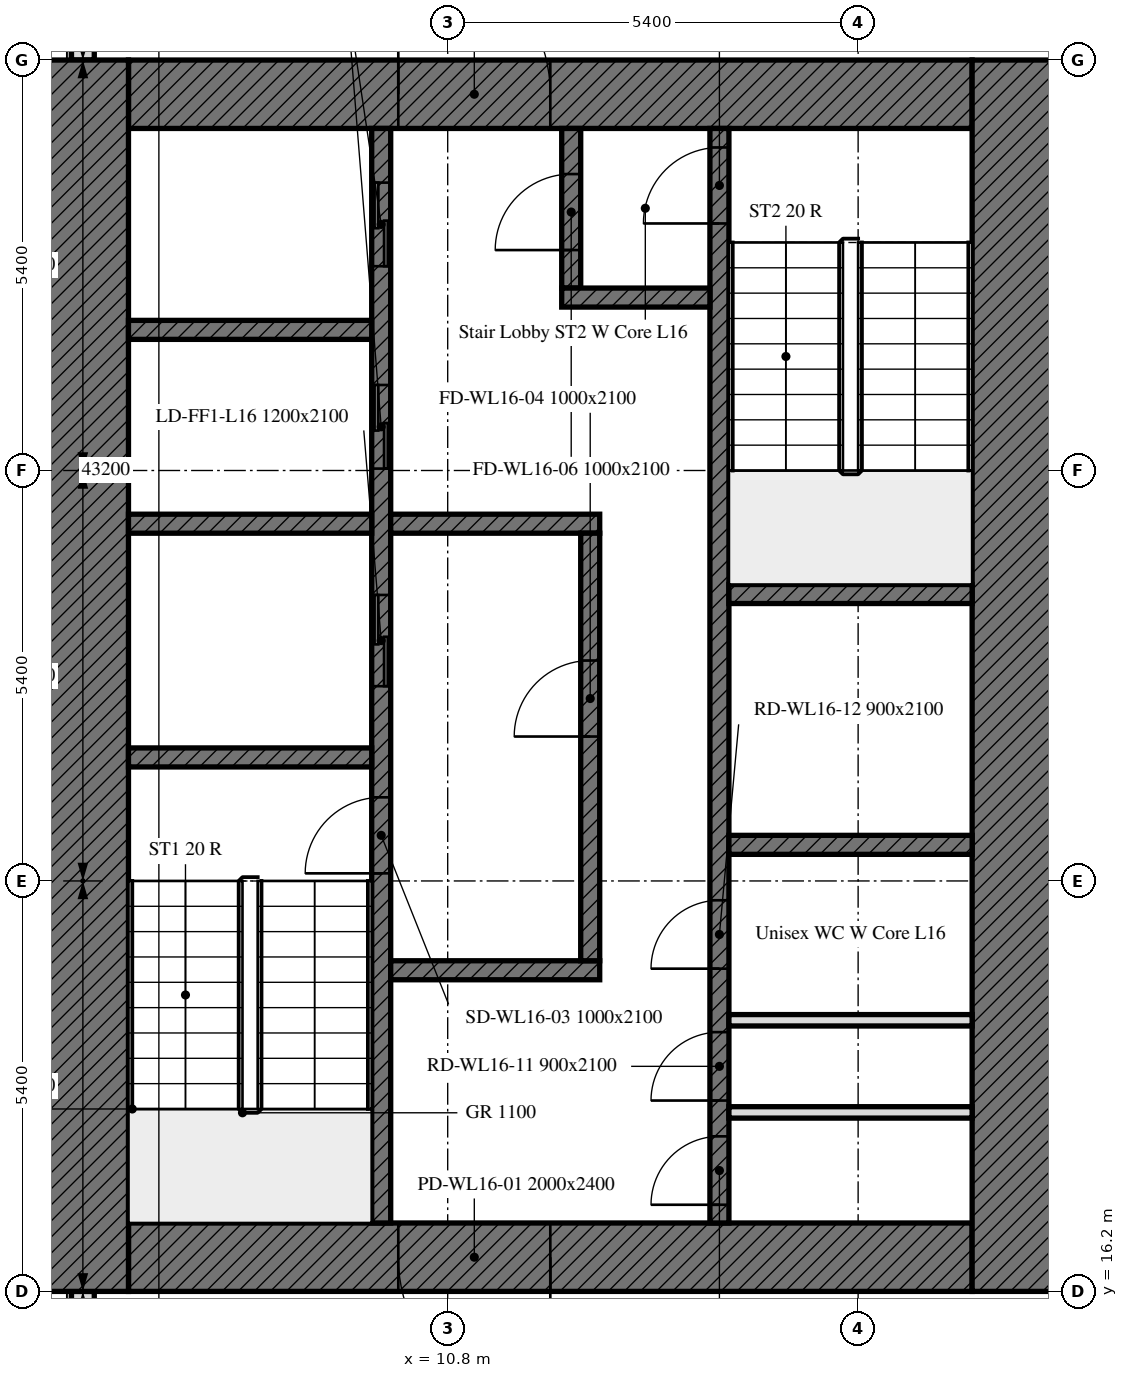
"""IFC4 building model, lengths in metres.
Left out: names, types, materials, properties, quantities, classifications, styles, units other than length and angle.
Written with IfcOpenShell. Run it as: python <this file> out.ifc"""

import sys

from ifc_helpers import new_model, si_unit, direction, frame, frame_2d, origin, place, context, subcontext, project, spatial, rectangle, extrude, element, fill, save


model = new_model("IFC4")
c1 = context("Model", 3, precision=1e-05, world=origin(), true_north=direction((0.0, 1.0)))
c2 = subcontext(c1, "Body", "Model", "MODEL_VIEW")
j1 = project(units=[si_unit("LENGTHUNIT", "METRE"), si_unit("PLANEANGLEUNIT", "RADIAN")], contexts=[c1])
p1 = place(None, origin())
s1 = spatial("IfcSite", under=j1, at=p1, CompositionType="ELEMENT")
p2 = place(p1, origin())
s2 = spatial("IfcBuilding", under=s1, at=p2, CompositionType="ELEMENT")
p3 = place(p2, frame((0.0, 0.0, 72.6)))
s3 = spatial("IfcBuildingStorey", under=s2, at=p3, CompositionType="ELEMENT", Elevation=72.6)
p4 = place(p3, frame((6.0, 43.014, 0.0), z_axis=(0.0, 0.0, 1.0), x_axis=(0.0, -1.0, 0.0)))
e1 = element("IfcWall", 1, at=p4, inside=s3, PredefinedType="SOLIDWALL", context=c2, shape_type="SweptSolid", body=[
    extrude(rectangle(XDim=10.614, YDim=0.3, at=frame_2d((5.307, 0.0))), origin(), (0.0, 0.0, 1.0), 3.5),
])
p5 = place(p4, frame((0.814, 0.0, 0.9)))
e2 = element("IfcOpeningElement", 2, at=p5, cuts=e1, PredefinedType="OPENING", context=c2, shape_type="SweptSolid", body=[
    extrude(rectangle(XDim=3.4, YDim=1.7, at=frame_2d((1.7, 0.85))), frame((0.0, 0.16, 0.0), z_axis=(0.0, -1.0, 0.0), x_axis=(1.0, 0.0, 0.0)), (0.0, 0.0, 1.0), 0.32),
])
p6 = place(p3, frame((6.0, 16.2, 0.0), z_axis=(0.0, 0.0, 1.0), x_axis=(0.0, -1.0, 0.0)))
e3 = element("IfcWall", 3, at=p6, inside=s3, PredefinedType="SOLIDWALL", context=c2, shape_type="SweptSolid", body=[
    extrude(rectangle(XDim=5.214, YDim=0.3, at=frame_2d((2.607, 0.0))), origin(), (0.0, 0.0, 1.0), 3.5),
])
p7 = place(p3, frame((17.7, 16.65, 0.0), z_axis=(0.0, 0.0, 1.0), x_axis=(-1.0, 0.0, 0.0)))
e4 = element("IfcWall", 4, at=p7, inside=s3, PredefinedType="SOLIDWALL", context=c2, shape_type="SweptSolid", body=[
    extrude(rectangle(XDim=11.1, YDim=0.9, at=frame_2d((5.55, 0.0))), origin(), (0.0, 0.0, 1.0), 3.5),
])
p8 = place(p7, frame((5.55, 0.0, 0.0)))
e5 = element("IfcOpeningElement", 5, at=p8, cuts=e4, PredefinedType="OPENING", context=c2, shape_type="SweptSolid", body=[
    extrude(rectangle(XDim=2.0, YDim=2.4, at=frame_2d((1.0, 1.2))), frame((0.0, 0.45, 0.0), z_axis=(0.0, -1.0, 0.0), x_axis=(1.0, 0.0, 0.0)), (0.0, 0.0, 1.0), 0.9),
])
p9 = place(p3, frame((6.6, 31.95, 0.0), z_axis=(0.0, 0.0, 1.0), x_axis=(1.0, 0.0, 0.0)))
e6 = element("IfcWall", 6, at=p9, inside=s3, PredefinedType="SOLIDWALL", context=c2, shape_type="SweptSolid", body=[
    extrude(rectangle(XDim=11.1, YDim=0.9, at=frame_2d((5.55, 0.0))), origin(), (0.0, 0.0, 1.0), 3.5),
])
p10 = place(p9, frame((3.55, 0.0, 0.0)))
e7 = element("IfcOpeningElement", 7, at=p10, cuts=e6, PredefinedType="OPENING", context=c2, shape_type="SweptSolid", body=[
    extrude(rectangle(XDim=2.0, YDim=2.4, at=frame_2d((1.0, 1.2))), frame((0.0, 0.45, 0.0), z_axis=(0.0, -1.0, 0.0), x_axis=(1.0, 0.0, 0.0)), (0.0, 0.0, 1.0), 0.9),
])
for number, where, z_axis, x_axis in (
    (8, (6.0, 16.2, 0.0), (0.0, 0.0, 1.0), (0.0, 1.0, 0.0)),
    (9, (18.3, 32.4, 0.0), (0.0, 0.0, 1.0), (0.0, -1.0, 0.0)),
):
    element("IfcWall", number, at=place(p3, frame(where, z_axis=z_axis, x_axis=x_axis)), inside=s3, PredefinedType="SOLIDWALL", context=c2, shape_type="SweptSolid", body=[
        extrude(rectangle(XDim=16.2, YDim=1.2, at=frame_2d((8.1, 0.0))), origin(), (0.0, 0.0, 1.0), 3.5),
    ])
p11 = place(p3, frame((9.925, 17.1, 0.0), z_axis=(0.0, 0.0, 1.0), x_axis=(0.0, 1.0, 0.0)))
e10 = element("IfcWall", 10, at=p11, inside=s3, PredefinedType="SOLIDWALL", context=c2, shape_type="SweptSolid", body=[
    extrude(rectangle(XDim=14.4, YDim=0.25, at=frame_2d((7.2, 0.0))), origin(), (0.0, 0.0, 1.0), 3.5),
])
p12 = place(p11, frame((4.6, 0.0, 0.0)))
e11 = element("IfcOpeningElement", 11, at=p12, cuts=e10, PredefinedType="OPENING", context=c2, shape_type="SweptSolid", body=[
    extrude(rectangle(XDim=1.0, YDim=2.1, at=frame_2d((0.5, 1.05))), frame((0.0, 0.125, 0.0), z_axis=(0.0, -1.0, 0.0), x_axis=(1.0, 0.0, 0.0)), (0.0, 0.0, 1.0), 0.25),
])
p13 = place(p11, frame((7.062, 0.0, 0.0)))
e12 = element("IfcOpeningElement", 12, at=p13, cuts=e10, PredefinedType="OPENING", context=c2, shape_type="SweptSolid", body=[
    extrude(rectangle(XDim=1.2, YDim=2.1, at=frame_2d((0.6, 1.05))), frame((0.0, 0.125, 0.0), z_axis=(0.0, -1.0, 0.0), x_axis=(1.0, 0.0, 0.0)), (0.0, 0.0, 1.0), 0.25),
])
p14 = place(p11, frame((9.925, 0.0, 0.0)))
e13 = element("IfcOpeningElement", 13, at=p14, cuts=e10, PredefinedType="OPENING", context=c2, shape_type="SweptSolid", body=[
    extrude(rectangle(XDim=1.1, YDim=2.1, at=frame_2d((0.55, 1.05))), frame((0.0, 0.125, 0.0), z_axis=(0.0, -1.0, 0.0), x_axis=(1.0, 0.0, 0.0)), (0.0, 0.0, 1.0), 0.25),
])
p15 = place(p11, frame((12.587, 0.0, 0.0)))
e14 = element("IfcOpeningElement", 14, at=p15, cuts=e10, PredefinedType="OPENING", context=c2, shape_type="SweptSolid", body=[
    extrude(rectangle(XDim=1.1, YDim=2.1, at=frame_2d((0.55, 1.05))), frame((0.0, 0.125, 0.0), z_axis=(0.0, -1.0, 0.0), x_axis=(1.0, 0.0, 0.0)), (0.0, 0.0, 1.0), 0.25),
])
p16 = place(p3, frame((14.375, 17.1, 0.0), z_axis=(0.0, 0.0, 1.0), x_axis=(0.0, 1.0, 0.0)))
e15 = element("IfcWall", 15, at=p16, inside=s3, PredefinedType="SOLIDWALL", context=c2, shape_type="SweptSolid", body=[
    extrude(rectangle(XDim=14.4, YDim=0.25, at=frame_2d((7.2, 0.0))), origin(), (0.0, 0.0, 1.0), 3.5),
])
p17 = place(p16, frame((13.15, 0.0, 0.0)))
e16 = element("IfcOpeningElement", 16, at=p17, cuts=e15, PredefinedType="OPENING", context=c2, shape_type="SweptSolid", body=[
    extrude(rectangle(XDim=1.0, YDim=2.1, at=frame_2d((0.5, 1.05))), frame((0.0, 0.125, 0.0), z_axis=(0.0, -1.0, 0.0), x_axis=(1.0, 0.0, 0.0)), (0.0, 0.0, 1.0), 0.25),
])
p18 = place(p16, frame((0.24, 0.0, 0.0)))
e17 = element("IfcOpeningElement", 17, at=p18, cuts=e15, PredefinedType="OPENING", context=c2, shape_type="SweptSolid", body=[
    extrude(rectangle(XDim=0.9, YDim=2.1, at=frame_2d((0.45, 1.05))), frame((0.0, 0.125, 0.0), z_axis=(0.0, -1.0, 0.0), x_axis=(1.0, 0.0, 0.0)), (0.0, 0.0, 1.0), 0.25),
])
p19 = place(p16, frame((1.611, 0.0, 0.0)))
e18 = element("IfcOpeningElement", 18, at=p19, cuts=e15, PredefinedType="OPENING", context=c2, shape_type="SweptSolid", body=[
    extrude(rectangle(XDim=0.9, YDim=2.1, at=frame_2d((0.45, 1.05))), frame((0.0, 0.125, 0.0), z_axis=(0.0, -1.0, 0.0), x_axis=(1.0, 0.0, 0.0)), (0.0, 0.0, 1.0), 0.25),
])
p20 = place(p16, frame((3.346, 0.0, 0.0)))
e19 = element("IfcOpeningElement", 19, at=p20, cuts=e15, PredefinedType="OPENING", context=c2, shape_type="SweptSolid", body=[
    extrude(rectangle(XDim=0.9, YDim=2.1, at=frame_2d((0.45, 1.05))), frame((0.0, 0.125, 0.0), z_axis=(0.0, -1.0, 0.0), x_axis=(1.0, 0.0, 0.0)), (0.0, 0.0, 1.0), 0.25),
])
for number, where, z_axis, x_axis in (
    (20, (6.6, 23.225, 0.0), (0.0, 0.0, 1.0), (1.0, 0.0, 0.0)),
    (21, (14.5, 25.375, 0.0), (0.0, 0.0, 1.0), (1.0, 0.0, 0.0)),
    (22, (14.5, 22.075, 0.0), (0.0, 0.0, 1.0), (1.0, 0.0, 0.0)),
    (23, (6.6, 26.3, 0.0), (0.0, 0.0, 1.0), (1.0, 0.0, 0.0)),
):
    element("IfcWall", number, at=place(p3, frame(where, z_axis=z_axis, x_axis=x_axis)), inside=s3, PredefinedType="SOLIDWALL", context=c2, shape_type="SweptSolid", body=[
        extrude(rectangle(XDim=3.2, YDim=0.25, at=frame_2d((1.6, 0.0))), origin(), (0.0, 0.0, 1.0), 3.5),
    ])
for number, where, z_axis, x_axis in (
    (24, (10.05, 26.3, 0.0), (0.0, 0.0, 1.0), (1.0, 0.0, 0.0)),
    (25, (10.05, 20.425, 0.0), (0.0, 0.0, 1.0), (1.0, 0.0, 0.0)),
):
    element("IfcWall", number, at=place(p3, frame(where, z_axis=z_axis, x_axis=x_axis)), inside=s3, PredefinedType="SOLIDWALL", context=c2, shape_type="SweptSolid", body=[
        extrude(rectangle(XDim=2.75, YDim=0.25, at=frame_2d((1.375, 0.0))), origin(), (0.0, 0.0, 1.0), 3.5),
    ])
p21 = place(p3, frame((12.425, 29.4, 0.0), z_axis=(0.0, 0.0, 1.0), x_axis=(0.0, 1.0, 0.0)))
e26 = element("IfcWall", 26, at=p21, inside=s3, PredefinedType="SOLIDWALL", context=c2, shape_type="SweptSolid", body=[
    extrude(rectangle(XDim=2.1, YDim=0.25, at=frame_2d((1.05, 0.0))), origin(), (0.0, 0.0, 1.0), 3.5),
])
p22 = place(p21, frame((0.5, 0.0, 0.0)))
e27 = element("IfcOpeningElement", 27, at=p22, cuts=e26, PredefinedType="OPENING", context=c2, shape_type="SweptSolid", body=[
    extrude(rectangle(XDim=1.0, YDim=2.1, at=frame_2d((0.5, 1.05))), frame((0.0, 0.125, 0.0), z_axis=(0.0, -1.0, 0.0), x_axis=(1.0, 0.0, 0.0)), (0.0, 0.0, 1.0), 0.25),
])
p23 = place(p3, frame((12.3, 29.275, 0.0), z_axis=(0.0, 0.0, 1.0), x_axis=(1.0, 0.0, 0.0)))
e28 = element("IfcWall", 28, at=p23, inside=s3, PredefinedType="SOLIDWALL", context=c2, shape_type="SweptSolid", body=[
    extrude(rectangle(XDim=1.95, YDim=0.25, at=frame_2d((0.975, 0.0))), origin(), (0.0, 0.0, 1.0), 3.5),
])
p24 = place(p3, frame((12.675, 20.55, 0.0), z_axis=(0.0, 0.0, 1.0), x_axis=(0.0, 1.0, 0.0)))
e29 = element("IfcWall", 29, at=p24, inside=s3, PredefinedType="SOLIDWALL", context=c2, shape_type="SweptSolid", body=[
    extrude(rectangle(XDim=5.625, YDim=0.25, at=frame_2d((2.812, 0.0))), origin(), (0.0, 0.0, 1.0), 3.5),
])
p25 = place(p24, frame((2.95, 0.0, 0.0)))
e30 = element("IfcOpeningElement", 30, at=p25, cuts=e29, PredefinedType="OPENING", context=c2, shape_type="SweptSolid", body=[
    extrude(rectangle(XDim=1.0, YDim=2.1, at=frame_2d((0.5, 1.05))), frame((0.0, 0.125, 0.0), z_axis=(0.0, -1.0, 0.0), x_axis=(1.0, 0.0, 0.0)), (0.0, 0.0, 1.0), 0.25),
])
p26 = place(p3, frame((6.6, 28.85, 0.0), z_axis=(0.0, 0.0, 1.0), x_axis=(1.0, 0.0, 0.0)))
e31 = element("IfcWall", 31, at=p26, inside=s3, PredefinedType="SOLIDWALL", context=c2, shape_type="SweptSolid", body=[
    extrude(rectangle(XDim=3.2, YDim=0.25, at=frame_2d((1.6, 0.0))), origin(), (0.0, 0.0, 1.0), 3.5),
])
for number, where, z_axis, x_axis in (
    (32, (14.5, 18.555, 0.0), (0.0, 0.0, 1.0), (1.0, 0.0, 0.0)),
    (33, (14.5, 19.767, 0.0), (0.0, 0.0, 1.0), (1.0, 0.0, 0.0)),
):
    element("IfcWall", number, at=place(p3, frame(where, z_axis=z_axis, x_axis=x_axis)), inside=s3, PredefinedType="PARTITIONING", context=c2, shape_type="SweptSolid", body=[
        extrude(rectangle(XDim=3.2, YDim=0.15, at=frame_2d((1.6, 0.0))), origin(), (0.0, 0.0, 1.0), 3.5),
    ])
p27 = place(p8, origin())
e34 = element("IfcDoor", 34, at=p27, inside=s3, OperationType="DOUBLE_DOOR_SINGLE_SWING", PredefinedType="DOOR", context=c2, shape_type="SweptSolid", body=[
    extrude(rectangle(XDim=2.0, YDim=2.4, at=frame_2d((1.0, 1.2))), frame((0.0, 0.025, 0.0), z_axis=(0.0, -1.0, 0.0), x_axis=(1.0, 0.0, 0.0)), (0.0, 0.0, 1.0), 0.05),
])
fill(e5, e34)
p28 = place(p10, origin())
e35 = element("IfcDoor", 35, at=p28, inside=s3, OperationType="DOUBLE_DOOR_SINGLE_SWING", PredefinedType="DOOR", context=c2, shape_type="SweptSolid", body=[
    extrude(rectangle(XDim=2.0, YDim=2.4, at=frame_2d((1.0, 1.2))), frame((0.0, 0.025, 0.0), z_axis=(0.0, -1.0, 0.0), x_axis=(1.0, 0.0, 0.0)), (0.0, 0.0, 1.0), 0.05),
])
fill(e7, e35)
p29 = place(p12, origin())
e36 = element("IfcDoor", 36, at=p29, inside=s3, OperationType="SINGLE_SWING_LEFT", PredefinedType="DOOR", context=c2, shape_type="SweptSolid", body=[
    extrude(rectangle(XDim=1.0, YDim=2.1, at=frame_2d((0.5, 1.05))), frame((0.0, 0.025, 0.0), z_axis=(0.0, -1.0, 0.0), x_axis=(1.0, 0.0, 0.0)), (0.0, 0.0, 1.0), 0.05),
])
fill(e11, e36)
p30 = place(p25, origin())
e37 = element("IfcDoor", 37, at=p30, inside=s3, OperationType="SINGLE_SWING_LEFT", PredefinedType="DOOR", context=c2, shape_type="SweptSolid", body=[
    extrude(rectangle(XDim=1.0, YDim=2.1, at=frame_2d((0.5, 1.05))), frame((0.0, 0.025, 0.0), z_axis=(0.0, -1.0, 0.0), x_axis=(1.0, 0.0, 0.0)), (0.0, 0.0, 1.0), 0.05),
])
fill(e30, e37)
p31 = place(p17, origin())
e38 = element("IfcDoor", 38, at=p31, inside=s3, OperationType="SINGLE_SWING_LEFT", PredefinedType="DOOR", context=c2, shape_type="SweptSolid", body=[
    extrude(rectangle(XDim=1.0, YDim=2.1, at=frame_2d((0.5, 1.05))), frame((0.0, 0.025, 0.0), z_axis=(0.0, -1.0, 0.0), x_axis=(1.0, 0.0, 0.0)), (0.0, 0.0, 1.0), 0.05),
])
fill(e16, e38)
p32 = place(p22, origin())
e39 = element("IfcDoor", 39, at=p32, inside=s3, OperationType="SINGLE_SWING_LEFT", PredefinedType="DOOR", context=c2, shape_type="SweptSolid", body=[
    extrude(rectangle(XDim=1.0, YDim=2.1, at=frame_2d((0.5, 1.05))), frame((0.0, 0.025, 0.0), z_axis=(0.0, -1.0, 0.0), x_axis=(1.0, 0.0, 0.0)), (0.0, 0.0, 1.0), 0.05),
])
fill(e27, e39)
p33 = place(p13, origin())
e40 = element("IfcDoor", 40, at=p33, inside=s3, OperationType="DOUBLE_DOOR_SLIDING", PredefinedType="DOOR", context=c2, shape_type="SweptSolid", body=[
    extrude(rectangle(XDim=1.2, YDim=2.1, at=frame_2d((0.6, 1.05))), frame((0.0, 0.025, 0.0), z_axis=(0.0, -1.0, 0.0), x_axis=(1.0, 0.0, 0.0)), (0.0, 0.0, 1.0), 0.05),
])
fill(e12, e40)
p34 = place(p14, origin())
e41 = element("IfcDoor", 41, at=p34, inside=s3, OperationType="DOUBLE_DOOR_SLIDING", PredefinedType="DOOR", context=c2, shape_type="SweptSolid", body=[
    extrude(rectangle(XDim=1.1, YDim=2.1, at=frame_2d((0.55, 1.05))), frame((0.0, 0.025, 0.0), z_axis=(0.0, -1.0, 0.0), x_axis=(1.0, 0.0, 0.0)), (0.0, 0.0, 1.0), 0.05),
])
fill(e13, e41)
p35 = place(p15, origin())
e42 = element("IfcDoor", 42, at=p35, inside=s3, OperationType="DOUBLE_DOOR_SLIDING", PredefinedType="DOOR", context=c2, shape_type="SweptSolid", body=[
    extrude(rectangle(XDim=1.1, YDim=2.1, at=frame_2d((0.55, 1.05))), frame((0.0, 0.025, 0.0), z_axis=(0.0, -1.0, 0.0), x_axis=(1.0, 0.0, 0.0)), (0.0, 0.0, 1.0), 0.05),
])
fill(e14, e42)
p36 = place(p18, origin())
e43 = element("IfcDoor", 43, at=p36, inside=s3, OperationType="SINGLE_SWING_LEFT", PredefinedType="DOOR", context=c2, shape_type="SweptSolid", body=[
    extrude(rectangle(XDim=0.9, YDim=2.1, at=frame_2d((0.45, 1.05))), frame((0.0, 0.025, 0.0), z_axis=(0.0, -1.0, 0.0), x_axis=(1.0, 0.0, 0.0)), (0.0, 0.0, 1.0), 0.05),
])
fill(e17, e43)
p37 = place(p19, origin())
e44 = element("IfcDoor", 44, at=p37, inside=s3, OperationType="SINGLE_SWING_LEFT", PredefinedType="DOOR", context=c2, shape_type="SweptSolid", body=[
    extrude(rectangle(XDim=0.9, YDim=2.1, at=frame_2d((0.45, 1.05))), frame((0.0, 0.025, 0.0), z_axis=(0.0, -1.0, 0.0), x_axis=(1.0, 0.0, 0.0)), (0.0, 0.0, 1.0), 0.05),
])
fill(e18, e44)
p38 = place(p20, origin())
e45 = element("IfcDoor", 45, at=p38, inside=s3, OperationType="SINGLE_SWING_LEFT", PredefinedType="DOOR", context=c2, shape_type="SweptSolid", body=[
    extrude(rectangle(XDim=0.9, YDim=2.1, at=frame_2d((0.45, 1.05))), frame((0.0, 0.025, 0.0), z_axis=(0.0, -1.0, 0.0), x_axis=(1.0, 0.0, 0.0)), (0.0, 0.0, 1.0), 0.05),
])
fill(e19, e45)
save(model, sys.argv[1])
